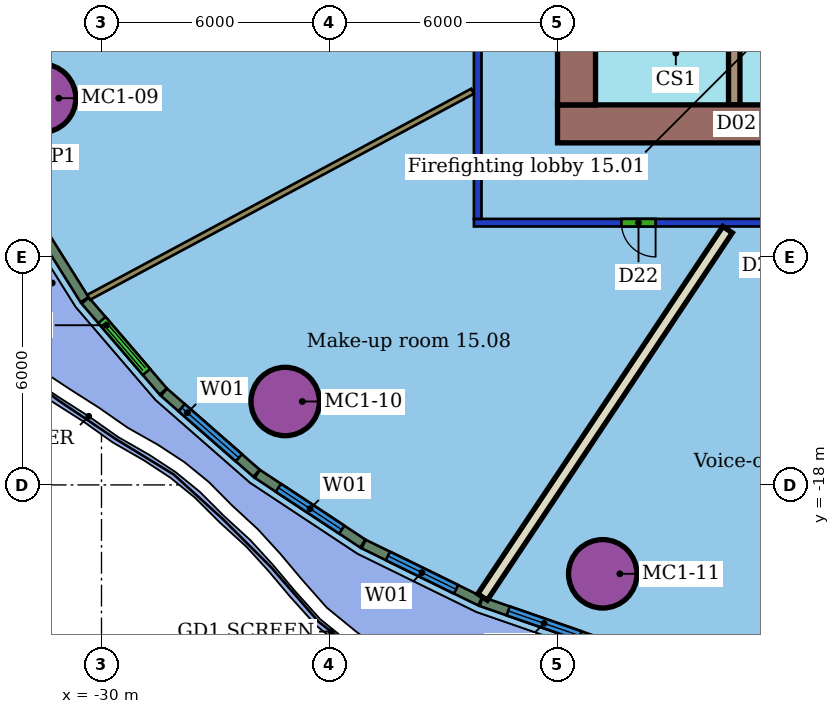
"""IFC4 building model, lengths in metres.
Left out: names, types, materials, properties, quantities, classifications, styles, units other than length and angle.
Written with IfcOpenShell. Run it as: python <this file> out.ifc"""

import sys

from ifc_helpers import new_model, si_unit, direction, frame, frame_2d, origin, origin_2d, place, context, subcontext, project, spatial, rectangle, hollow_circle, extrude, element, fill, save


model = new_model("IFC4")
c1 = context("Model", 3, precision=1e-05, world=origin(), true_north=direction((0.0, 1.0)))
c2 = subcontext(c1, "Body", "Model", "MODEL_VIEW")
j1 = project(units=[si_unit("LENGTHUNIT", "METRE"), si_unit("PLANEANGLEUNIT", "RADIAN")], contexts=[c1])
p1 = place(None, origin())
s1 = spatial("IfcSite", under=j1, at=p1, CompositionType="ELEMENT")
p2 = place(p1, origin())
s2 = spatial("IfcBuilding", under=s1, at=p2, CompositionType="ELEMENT")
p3 = place(p2, frame((0.0, 0.0, 73.0)))
s3 = spatial("IfcBuildingStorey", under=s2, at=p3, CompositionType="ELEMENT", Elevation=73.0)
for number, where, z_axis, x_axis in (
    (1, (-31.575, -7.824, 0.0), (0.0, 0.0, 1.0), (1.0, 0.0, 0.0)),
    (2, (-25.166, -15.805, 0.0), (0.0, 0.0, 1.0), (1.0, 0.0, 0.0)),
    (3, (-16.81, -20.339, 0.0), (0.0, 0.0, 1.0), (1.0, 0.0, 0.0)),
):
    element("IfcColumn", number, at=place(p3, frame(where, z_axis=z_axis, x_axis=x_axis)), inside=s3, PredefinedType="COLUMN", context=c2, shape_type="SweptSolid", body=[
        extrude(hollow_circle(Radius=0.9, WallThickness=0.06, at=origin_2d()), origin(), (0.0, 0.0, 1.0), 3.55),
    ])
p4 = place(p3, frame((8.2, -11.1, 0.0), z_axis=(0.0, 0.0, 1.0), x_axis=(-1.0, 0.0, 0.0)))
e4 = element("IfcWall", 4, at=p4, inside=s3, PredefinedType="PARTITIONING", context=c2, shape_type="SweptSolid", body=[
    extrude(rectangle(XDim=28.4, YDim=0.2, at=frame_2d((14.2, 0.0))), origin(), (0.0, 0.0, 1.0), 2.85),
])
p5 = place(p4, frame((23.619, 0.0, 0.0)))
e5 = element("IfcOpeningElement", 5, at=p5, cuts=e4, PredefinedType="OPENING", context=c2, shape_type="SweptSolid", body=[
    extrude(rectangle(XDim=0.9, YDim=2.1, at=frame_2d((0.45, 1.05))), frame((0.0, 0.11, 0.0), z_axis=(0.0, -1.0, 0.0), x_axis=(1.0, 0.0, 0.0)), (0.0, 0.0, 1.0), 0.22),
])
p6 = place(p4, frame((18.435, 0.0, 0.0)))
e6 = element("IfcOpeningElement", 6, at=p6, cuts=e4, PredefinedType="OPENING", context=c2, shape_type="SweptSolid", body=[
    extrude(rectangle(XDim=1.1, YDim=2.1, at=frame_2d((0.55, 1.05))), frame((0.0, 0.11, 0.0), z_axis=(0.0, -1.0, 0.0), x_axis=(1.0, 0.0, 0.0)), (0.0, 0.0, 1.0), 0.22),
])
p7 = place(p4, frame((9.94, 0.0, 0.0)))
e7 = element("IfcOpeningElement", 7, at=p7, cuts=e4, PredefinedType="OPENING", context=c2, shape_type="SweptSolid", body=[
    extrude(rectangle(XDim=1.0, YDim=2.1, at=frame_2d((0.5, 1.05))), frame((0.0, 0.11, 0.0), z_axis=(0.0, -1.0, 0.0), x_axis=(1.0, 0.0, 0.0)), (0.0, 0.0, 1.0), 0.22),
])
p8 = place(p4, frame((4.945, 0.0, 0.0)))
e8 = element("IfcOpeningElement", 8, at=p8, cuts=e4, PredefinedType="OPENING", context=c2, shape_type="SweptSolid", body=[
    extrude(rectangle(XDim=1.0, YDim=2.1, at=frame_2d((0.5, 1.05))), frame((0.0, 0.11, 0.0), z_axis=(0.0, -1.0, 0.0), x_axis=(1.0, 0.0, 0.0)), (0.0, 0.0, 1.0), 0.22),
])
p9 = place(p3, frame((-20.1, -11.0, 0.0), z_axis=(0.0, 0.0, 1.0), x_axis=(0.0, 1.0, 0.0)))
e9 = element("IfcWall", 9, at=p9, inside=s3, PredefinedType="PARTITIONING", context=c2, shape_type="SweptSolid", body=[
    extrude(rectangle(XDim=22.0, YDim=0.2, at=frame_2d((11.0, 0.0))), origin(), (0.0, 0.0, 1.0), 2.85),
])
p10 = place(p9, frame((18.354, 0.0, 0.0)))
e10 = element("IfcOpeningElement", 10, at=p10, cuts=e9, PredefinedType="OPENING", context=c2, shape_type="SweptSolid", body=[
    extrude(rectangle(XDim=1.0, YDim=2.1, at=frame_2d((0.5, 1.05))), frame((0.0, 0.11, 0.0), z_axis=(0.0, -1.0, 0.0), x_axis=(1.0, 0.0, 0.0)), (0.0, 0.0, 1.0), 0.22),
])
p11 = place(p9, frame((13.865, 0.0, 0.0)))
e11 = element("IfcOpeningElement", 11, at=p11, cuts=e9, PredefinedType="OPENING", context=c2, shape_type="SweptSolid", body=[
    extrude(rectangle(XDim=1.1, YDim=2.1, at=frame_2d((0.55, 1.05))), frame((0.0, 0.11, 0.0), z_axis=(0.0, -1.0, 0.0), x_axis=(1.0, 0.0, 0.0)), (0.0, 0.0, 1.0), 0.22),
])
p12 = place(p9, frame((5.305, 0.0, 0.0)))
e12 = element("IfcOpeningElement", 12, at=p12, cuts=e9, PredefinedType="OPENING", context=c2, shape_type="SweptSolid", body=[
    extrude(rectangle(XDim=1.0, YDim=2.1, at=frame_2d((0.5, 1.05))), frame((0.0, 0.11, 0.0), z_axis=(0.0, -1.0, 0.0), x_axis=(1.0, 0.0, 0.0)), (0.0, 0.0, 1.0), 0.22),
])
p13 = place(p3, frame((-30.337, -13.063, 0.0), z_axis=(0.0, 0.0, 1.0), x_axis=(0.881100754634, 0.472928599456, 0.0)))
e13 = element("IfcWall", 13, at=p13, inside=s3, PredefinedType="PARTITIONING", context=c2, shape_type="SweptSolid", body=[
    extrude(rectangle(XDim=11.465, YDim=0.15, at=frame_2d((5.732, 0.0))), origin(), (0.0, 0.0, 1.0), 3.55),
])
p14 = place(p3, frame((-19.973, -20.949, 0.0), z_axis=(0.0, 0.0, 1.0), x_axis=(0.554894141309, 0.831920964961, 0.0)))
e14 = element("IfcWall", 14, at=p14, inside=s3, PredefinedType="PARTITIONING", context=c2, shape_type="SweptSolid", body=[
    extrude(rectangle(XDim=11.619, YDim=0.3, at=frame_2d((5.81, 0.0))), origin(), (0.0, 0.0, 1.0), 3.55),
])
p15 = place(p3, frame((-32.062, -10.548, 0.0), z_axis=(0.0, 0.0, 1.0), x_axis=(0.531461731017, -0.847082303241, 0.0)))
e15 = element("IfcWall", 15, at=p15, inside=s3, PredefinedType="SOLIDWALL", context=c2, shape_type="SweptSolid", body=[
    extrude(rectangle(XDim=3.044, YDim=0.25, at=frame_2d((1.522, 0.0))), origin(), (0.0, 0.0, 1.0), 3.15),
])
p16 = place(p3, frame((-30.429, -13.147, 0.0), z_axis=(0.0, 0.0, 1.0), x_axis=(0.651320140898, -0.75880305354, 0.0)))
e16 = element("IfcWall", 16, at=p16, inside=s3, PredefinedType="SOLIDWALL", context=c2, shape_type="SweptSolid", body=[
    extrude(rectangle(XDim=3.155, YDim=0.25, at=frame_2d((1.578, 0.0))), origin(), (0.0, 0.0, 1.0), 3.15),
])
p17 = place(p16, frame((0.677, 0.0, 0.0)))
e17 = element("IfcOpeningElement", 17, at=p17, cuts=e16, PredefinedType="OPENING", context=c2, shape_type="SweptSolid", body=[
    extrude(rectangle(XDim=1.8, YDim=2.4, at=frame_2d((0.9, 1.2))), frame((0.0, 0.135, 0.0), z_axis=(0.0, -1.0, 0.0), x_axis=(1.0, 0.0, 0.0)), (0.0, 0.0, 1.0), 0.27),
])
p18 = place(p3, frame((-28.356, -15.56, 0.0), z_axis=(0.0, 0.0, 1.0), x_axis=(0.752375826342, -0.658734101088, 0.0)))
e18 = element("IfcWall", 18, at=p18, inside=s3, PredefinedType="SOLIDWALL", context=c2, shape_type="SweptSolid", body=[
    extrude(rectangle(XDim=3.238, YDim=0.25, at=frame_2d((1.619, 0.0))), origin(), (0.0, 0.0, 1.0), 3.15),
])
p19 = place(p18, frame((0.619, 0.0, 0.8)))
e19 = element("IfcOpeningElement", 19, at=p19, cuts=e18, PredefinedType="OPENING", context=c2, shape_type="SweptSolid", body=[
    extrude(rectangle(XDim=2.0, YDim=2.2, at=frame_2d((1.0, 1.1))), frame((0.0, 0.135, 0.0), z_axis=(0.0, -1.0, 0.0), x_axis=(1.0, 0.0, 0.0)), (0.0, 0.0, 1.0), 0.27),
])
p20 = place(p3, frame((-25.9, -17.708, 0.0), z_axis=(0.0, 0.0, 1.0), x_axis=(0.834288934292, -0.551327465413, 0.0)))
e20 = element("IfcWall", 20, at=p20, inside=s3, PredefinedType="SOLIDWALL", context=c2, shape_type="SweptSolid", body=[
    extrude(rectangle(XDim=3.329, YDim=0.25, at=frame_2d((1.664, 0.0))), origin(), (0.0, 0.0, 1.0), 3.15),
])
p21 = place(p20, frame((0.664, 0.0, 0.8)))
e21 = element("IfcOpeningElement", 21, at=p21, cuts=e20, PredefinedType="OPENING", context=c2, shape_type="SweptSolid", body=[
    extrude(rectangle(XDim=2.0, YDim=2.2, at=frame_2d((1.0, 1.1))), frame((0.0, 0.135, 0.0), z_axis=(0.0, -1.0, 0.0), x_axis=(1.0, 0.0, 0.0)), (0.0, 0.0, 1.0), 0.27),
])
p22 = place(p3, frame((-23.102, -19.555, 0.0), z_axis=(0.0, 0.0, 1.0), x_axis=(0.89802471606, -0.439945007184, 0.0)))
e22 = element("IfcWall", 22, at=p22, inside=s3, PredefinedType="SOLIDWALL", context=c2, shape_type="SweptSolid", body=[
    extrude(rectangle(XDim=3.419, YDim=0.25, at=frame_2d((1.71, 0.0))), origin(), (0.0, 0.0, 1.0), 3.15),
])
p23 = place(p22, frame((0.71, 0.0, 0.8)))
e23 = element("IfcOpeningElement", 23, at=p23, cuts=e22, PredefinedType="OPENING", context=c2, shape_type="SweptSolid", body=[
    extrude(rectangle(XDim=2.0, YDim=2.2, at=frame_2d((1.0, 1.1))), frame((0.0, 0.135, 0.0), z_axis=(0.0, -1.0, 0.0), x_axis=(1.0, 0.0, 0.0)), (0.0, 0.0, 1.0), 0.27),
])
p24 = place(p3, frame((-20.01, -21.069, 0.0), z_axis=(0.0, 0.0, 1.0), x_axis=(0.944948803813, -0.327218211861, 0.0)))
e24 = element("IfcWall", 24, at=p24, inside=s3, PredefinedType="SOLIDWALL", context=c2, shape_type="SweptSolid", body=[
    extrude(rectangle(XDim=3.505, YDim=0.25, at=frame_2d((1.752, 0.0))), origin(), (0.0, 0.0, 1.0), 3.15),
])
p25 = place(p24, frame((0.753, 0.0, 0.8)))
e25 = element("IfcOpeningElement", 25, at=p25, cuts=e24, PredefinedType="OPENING", context=c2, shape_type="SweptSolid", body=[
    extrude(rectangle(XDim=2.0, YDim=2.2, at=frame_2d((1.0, 1.1))), frame((0.0, 0.135, 0.0), z_axis=(0.0, -1.0, 0.0), x_axis=(1.0, 0.0, 0.0)), (0.0, 0.0, 1.0), 0.27),
])
p26 = place(p3, frame((-18.0, -8.5, 0.0), z_axis=(0.0, 0.0, 1.0), x_axis=(1.0, 0.0, 0.0)))
e26 = element("IfcWall", 26, at=p26, inside=s3, PredefinedType="SHEAR", context=c2, shape_type="SweptSolid", body=[
    extrude(rectangle(XDim=24.0, YDim=1.0, at=frame_2d((12.0, 0.0))), origin(), (0.0, 0.0, 1.0), 3.4),
])
p27 = place(p26, frame((6.0, 0.0, 0.0)))
e27 = element("IfcOpeningElement", 27, at=p27, cuts=e26, PredefinedType="OPENING", context=c2, shape_type="SweptSolid", body=[
    extrude(rectangle(XDim=1.2, YDim=2.1, at=frame_2d((0.6, 1.05))), frame((0.0, 0.51, 0.0), z_axis=(0.0, -1.0, 0.0), x_axis=(1.0, 0.0, 0.0)), (0.0, 0.0, 1.0), 1.02),
])
p28 = place(p3, frame((-17.5, 8.0, 0.0), z_axis=(0.0, 0.0, 1.0), x_axis=(0.0, -1.0, 0.0)))
e28 = element("IfcWall", 28, at=p28, inside=s3, PredefinedType="SHEAR", context=c2, shape_type="SweptSolid", body=[
    extrude(rectangle(XDim=16.0, YDim=1.0, at=frame_2d((8.0, 0.0))), origin(), (0.0, 0.0, 1.0), 3.4),
])
p29 = place(p28, frame((11.9, 0.0, 0.0)))
e29 = element("IfcOpeningElement", 29, at=p29, cuts=e28, PredefinedType="OPENING", context=c2, shape_type="SweptSolid", body=[
    extrude(rectangle(XDim=1.2, YDim=2.1, at=frame_2d((0.6, 1.05))), frame((0.0, 0.51, 0.0), z_axis=(0.0, -1.0, 0.0), x_axis=(1.0, 0.0, 0.0)), (0.0, 0.0, 1.0), 1.02),
])
p30 = place(p28, frame((2.9, 0.0, 0.0)))
e30 = element("IfcOpeningElement", 30, at=p30, cuts=e28, PredefinedType="OPENING", context=c2, shape_type="SweptSolid", body=[
    extrude(rectangle(XDim=1.2, YDim=2.1, at=frame_2d((0.6, 1.05))), frame((0.0, 0.51, 0.0), z_axis=(0.0, -1.0, 0.0), x_axis=(1.0, 0.0, 0.0)), (0.0, 0.0, 1.0), 1.02),
])
p31 = place(p3, frame((-13.35, 8.0, 0.0), z_axis=(0.0, 0.0, 1.0), x_axis=(0.0, -1.0, 0.0)))
e31 = element("IfcWall", 31, at=p31, inside=s3, PredefinedType="SHEAR", context=c2, shape_type="SweptSolid", body=[
    extrude(rectangle(XDim=16.0, YDim=0.3, at=frame_2d((8.0, 0.0))), origin(), (0.0, 0.0, 1.0), 3.4),
])
p32 = place(p31, frame((7.25, 0.0, 0.0)))
e32 = element("IfcOpeningElement", 32, at=p32, cuts=e31, PredefinedType="OPENING", context=c2, shape_type="SweptSolid", body=[
    extrude(rectangle(XDim=1.5, YDim=2.1, at=frame_2d((0.75, 1.05))), frame((0.0, 0.16, 0.0), z_axis=(0.0, -1.0, 0.0), x_axis=(1.0, 0.0, 0.0)), (0.0, 0.0, 1.0), 0.32),
])
p33 = place(p5, origin())
e33 = element("IfcDoor", 33, at=p33, inside=s3, OperationType="SINGLE_SWING_LEFT", PredefinedType="DOOR", context=c2, shape_type="SweptSolid", body=[
    extrude(rectangle(XDim=0.9, YDim=2.1, at=frame_2d((0.45, 1.05))), frame((0.0, 0.025, 0.0), z_axis=(0.0, -1.0, 0.0), x_axis=(1.0, 0.0, 0.0)), (0.0, 0.0, 1.0), 0.05),
])
fill(e5, e33)
p34 = place(p17, origin())
e34 = element("IfcDoor", 34, at=p34, inside=s3, OperationType="DOUBLE_DOOR_SLIDING", PredefinedType="DOOR", context=c2, shape_type="SweptSolid", body=[
    extrude(rectangle(XDim=1.8, YDim=2.4, at=frame_2d((0.9, 1.2))), frame((0.0, 0.025, 0.0), z_axis=(0.0, -1.0, 0.0), x_axis=(1.0, 0.0, 0.0)), (0.0, 0.0, 1.0), 0.05),
])
fill(e17, e34)
p35 = place(p19, origin())
e35 = element("IfcWindow", 35, at=p35, inside=s3, PartitioningType="SINGLE_PANEL", PredefinedType="WINDOW", context=c2, shape_type="SweptSolid", body=[
    extrude(rectangle(XDim=2.0, YDim=2.2, at=frame_2d((1.0, 1.1))), frame((0.0, 0.03, 0.0), z_axis=(0.0, -1.0, 0.0), x_axis=(1.0, 0.0, 0.0)), (0.0, 0.0, 1.0), 0.06),
])
fill(e19, e35)
p36 = place(p21, origin())
e36 = element("IfcWindow", 36, at=p36, inside=s3, PartitioningType="SINGLE_PANEL", PredefinedType="WINDOW", context=c2, shape_type="SweptSolid", body=[
    extrude(rectangle(XDim=2.0, YDim=2.2, at=frame_2d((1.0, 1.1))), frame((0.0, 0.03, 0.0), z_axis=(0.0, -1.0, 0.0), x_axis=(1.0, 0.0, 0.0)), (0.0, 0.0, 1.0), 0.06),
])
fill(e21, e36)
p37 = place(p23, origin())
e37 = element("IfcWindow", 37, at=p37, inside=s3, PartitioningType="SINGLE_PANEL", PredefinedType="WINDOW", context=c2, shape_type="SweptSolid", body=[
    extrude(rectangle(XDim=2.0, YDim=2.2, at=frame_2d((1.0, 1.1))), frame((0.0, 0.03, 0.0), z_axis=(0.0, -1.0, 0.0), x_axis=(1.0, 0.0, 0.0)), (0.0, 0.0, 1.0), 0.06),
])
fill(e23, e37)
p38 = place(p25, origin())
e38 = element("IfcWindow", 38, at=p38, inside=s3, PartitioningType="SINGLE_PANEL", PredefinedType="WINDOW", context=c2, shape_type="SweptSolid", body=[
    extrude(rectangle(XDim=2.0, YDim=2.2, at=frame_2d((1.0, 1.1))), frame((0.0, 0.03, 0.0), z_axis=(0.0, -1.0, 0.0), x_axis=(1.0, 0.0, 0.0)), (0.0, 0.0, 1.0), 0.06),
])
fill(e25, e38)
save(model, sys.argv[1])
